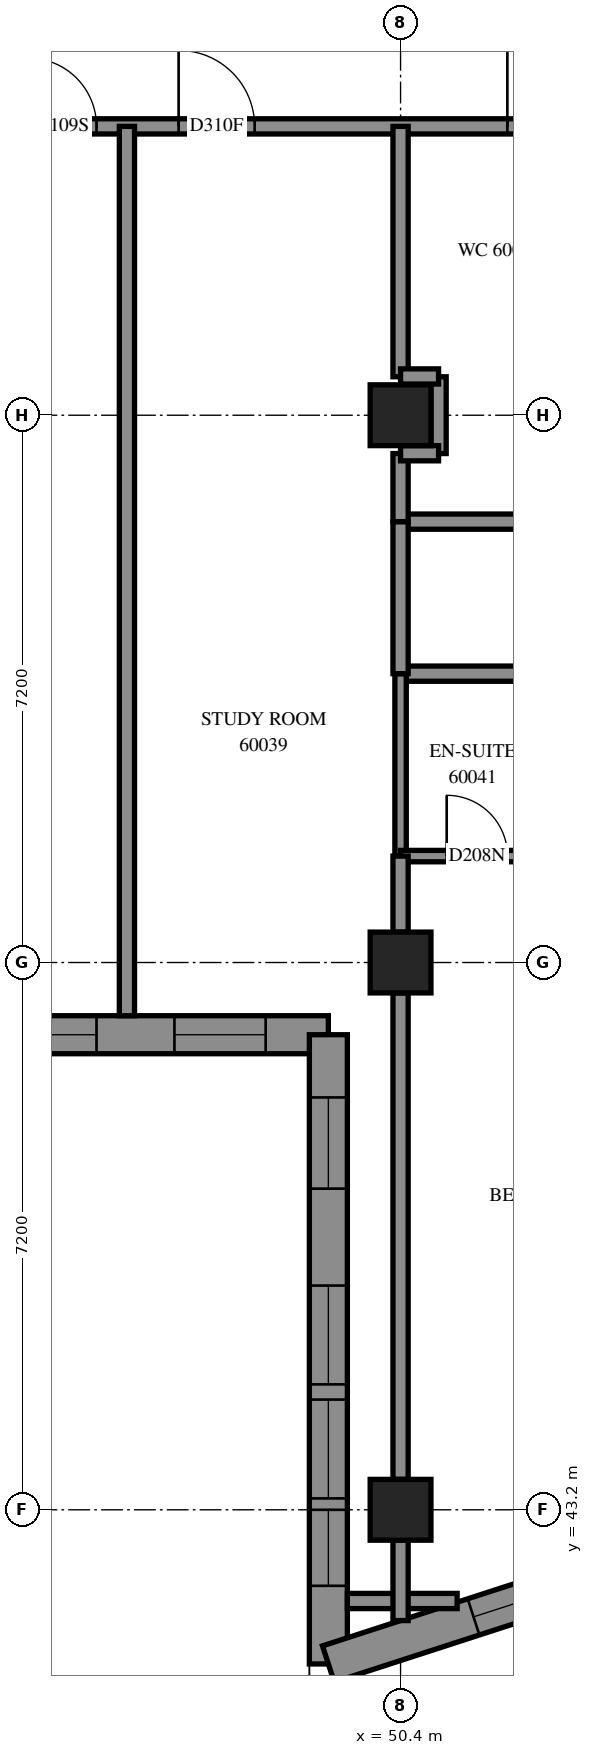
"""IFC4 building model, lengths in metres.
Left out: names, types, materials, properties, quantities, classifications, styles, units other than length and angle.
Written with IfcOpenShell. Run it as: python <this file> out.ifc"""

import sys

from ifc_helpers import new_model, si_unit, direction, frame, frame_2d, origin, origin_2d, place, context, subcontext, project, spatial, polyline, rectangle, outline, extrude, element, fill, save


model = new_model("IFC4")
c1 = context("Model", 3, precision=1e-05, world=origin(), true_north=direction((0.0, 1.0)))
c2 = subcontext(c1, "Body", "Model", "MODEL_VIEW")
j1 = project(units=[si_unit("LENGTHUNIT", "METRE"), si_unit("PLANEANGLEUNIT", "RADIAN")], contexts=[c1])
p1 = place(None, origin())
s1 = spatial("IfcSite", under=j1, at=p1, CompositionType="ELEMENT")
p2 = place(p1, origin())
s2 = spatial("IfcBuilding", under=s1, at=p2, CompositionType="ELEMENT")
p3 = place(p2, frame((0.0, 0.0, 220.2)))
s3 = spatial("IfcBuildingStorey", under=s2, at=p3, CompositionType="ELEMENT", Elevation=220.2)
for number, where, z_axis, x_axis in (
    (1, (50.4, 43.2, 0.0), (0.0, 0.0, 1.0), (1.0, 0.0, 0.0)),
    (2, (50.4, 50.4, 0.0), (0.0, 0.0, 1.0), (1.0, 0.0, 0.0)),
    (3, (50.4, 57.6, 0.0), (0.0, 0.0, 1.0), (1.0, 0.0, 0.0)),
):
    element("IfcColumn", number, at=place(p3, frame(where, z_axis=z_axis, x_axis=x_axis)), inside=s3, PredefinedType="COLUMN", context=c2, shape_type="SweptSolid", body=[
        extrude(rectangle(XDim=0.8, YDim=0.8, at=origin_2d()), origin(), (0.0, 0.0, 1.0), 3.1),
    ])
p4 = place(p3, frame((42.25, 49.45, 0.0), z_axis=(0.0, 0.0, 1.0), x_axis=(1.0, 0.0, 0.0)))
e4 = element("IfcWall", 4, at=p4, inside=s3, PredefinedType="SOLIDWALL", context=c2, shape_type="SweptSolid", body=[
    extrude(outline(polyline([(-0.25, -0.25), (6.95, -0.25), (7.45, 0.25), (0.25, 0.25), (-0.25, -0.25)])), origin(), (0.0, 0.0, 1.0), 3.1),
])
p5 = place(p4, frame((1.35, 0.0, 0.45)))
e5 = element("IfcOpeningElement", 5, at=p5, cuts=e4, PredefinedType="OPENING", context=c2, shape_type="SweptSolid", body=[
    extrude(rectangle(XDim=1.3, YDim=2.5, at=frame_2d((0.65, 1.25))), frame((0.0, 0.26, 0.0), z_axis=(0.0, -1.0, 0.0), x_axis=(1.0, 0.0, 0.0)), (0.0, 0.0, 1.0), 0.52),
])
p6 = place(p4, frame((2.85, 0.0, 0.45)))
e6 = element("IfcOpeningElement", 6, at=p6, cuts=e4, PredefinedType="OPENING", context=c2, shape_type="SweptSolid", body=[
    extrude(rectangle(XDim=1.3, YDim=2.5, at=frame_2d((0.65, 1.25))), frame((0.0, 0.26, 0.0), z_axis=(0.0, -1.0, 0.0), x_axis=(1.0, 0.0, 0.0)), (0.0, 0.0, 1.0), 0.52),
])
p7 = place(p4, frame((5.175, 0.0, 0.45)))
e7 = element("IfcOpeningElement", 7, at=p7, cuts=e4, PredefinedType="OPENING", context=c2, shape_type="SweptSolid", body=[
    extrude(rectangle(XDim=1.2, YDim=2.5, at=frame_2d((0.6, 1.25))), frame((0.0, 0.26, 0.0), z_axis=(0.0, -1.0, 0.0), x_axis=(1.0, 0.0, 0.0)), (0.0, 0.0, 1.0), 0.52),
])
p8 = place(p3, frame((49.45, 49.45, 0.0), z_axis=(0.0, 0.0, 1.0), x_axis=(0.0, -1.0, 0.0)))
e8 = element("IfcWall", 8, at=p8, inside=s3, PredefinedType="SOLIDWALL", context=c2, shape_type="SweptSolid", body=[
    extrude(outline(polyline([(0.25, -0.25), (8.622, -0.25), (7.934, 0.25), (-0.25, 0.25), (0.25, -0.25)])), origin(), (0.0, 0.0, 1.0), 3.1),
])
p9 = place(p8, frame((3.3, 0.0, 0.45)))
e9 = element("IfcOpeningElement", 9, at=p9, cuts=e8, PredefinedType="OPENING", context=c2, shape_type="SweptSolid", body=[
    extrude(rectangle(XDim=1.3, YDim=2.5, at=frame_2d((0.65, 1.25))), frame((0.0, 0.26, 0.0), z_axis=(0.0, -1.0, 0.0), x_axis=(1.0, 0.0, 0.0)), (0.0, 0.0, 1.0), 0.52),
])
p10 = place(p8, frame((4.8, 0.0, 0.45)))
e10 = element("IfcOpeningElement", 10, at=p10, cuts=e8, PredefinedType="OPENING", context=c2, shape_type="SweptSolid", body=[
    extrude(rectangle(XDim=1.3, YDim=2.5, at=frame_2d((0.65, 1.25))), frame((0.0, 0.26, 0.0), z_axis=(0.0, -1.0, 0.0), x_axis=(1.0, 0.0, 0.0)), (0.0, 0.0, 1.0), 0.52),
])
p11 = place(p8, frame((0.825, 0.0, 0.45)))
e11 = element("IfcOpeningElement", 11, at=p11, cuts=e8, PredefinedType="OPENING", context=c2, shape_type="SweptSolid", body=[
    extrude(rectangle(XDim=1.2, YDim=2.5, at=frame_2d((0.6, 1.25))), frame((0.0, 0.26, 0.0), z_axis=(0.0, -1.0, 0.0), x_axis=(1.0, 0.0, 0.0)), (0.0, 0.0, 1.0), 0.52),
])
p12 = place(p8, frame((6.25, 0.0, 0.45)))
e12 = element("IfcOpeningElement", 12, at=p12, cuts=e8, PredefinedType="OPENING", context=c2, shape_type="SweptSolid", body=[
    extrude(rectangle(XDim=1.0, YDim=2.5, at=frame_2d((0.5, 1.25))), frame((0.0, 0.26, 0.0), z_axis=(0.0, -1.0, 0.0), x_axis=(1.0, 0.0, 0.0)), (0.0, 0.0, 1.0), 0.52),
])
p13 = place(p3, frame((49.45, 41.172, 0.0), z_axis=(0.0, 0.0, 1.0), x_axis=(0.9512775992, 0.3083357412, 0.0)))
e13 = element("IfcWall", 13, at=p13, inside=s3, PredefinedType="SOLIDWALL", context=c2, shape_type="SweptSolid", body=[
    extrude(outline(polyline([(-0.344, -0.25), (3.457, -0.25), (3.577, 0.25), (0.344, 0.25), (-0.344, -0.25)])), origin(), (0.0, 0.0, 1.0), 3.1),
])
p14 = place(p13, frame((2.008, 0.0, 0.45)))
e14 = element("IfcOpeningElement", 14, at=p14, cuts=e13, PredefinedType="OPENING", context=c2, shape_type="SweptSolid", body=[
    extrude(rectangle(XDim=1.2, YDim=2.5, at=frame_2d((0.6, 1.25))), frame((0.0, 0.26, 0.0), z_axis=(0.0, -1.0, 0.0), x_axis=(1.0, 0.0, 0.0)), (0.0, 0.0, 1.0), 0.52),
])
p15 = place(p3, frame((36.0, 61.4, 0.0), z_axis=(0.0, 0.0, 1.0), x_axis=(1.0, 0.0, 0.0)))
e15 = element("IfcWall", 15, at=p15, inside=s3, PredefinedType="PARTITIONING", context=c2, shape_type="SweptSolid", body=[
    extrude(rectangle(XDim=17.0, YDim=0.2, at=frame_2d((8.5, 0.0))), origin(), (0.0, 0.0, 1.0), 3.1),
])
p16 = place(p15, frame((2.3, 0.0, 0.0)))
e16 = element("IfcOpeningElement", 16, at=p16, cuts=e15, PredefinedType="OPENING", context=c2, shape_type="SweptSolid", body=[
    extrude(rectangle(XDim=0.9, YDim=2.1, at=frame_2d((0.45, 1.05))), frame((0.0, 0.11, 0.0), z_axis=(0.0, -1.0, 0.0), x_axis=(1.0, 0.0, 0.0)), (0.0, 0.0, 1.0), 0.22),
])
p17 = place(p15, frame((4.125, 0.0, 0.0)))
e17 = element("IfcOpeningElement", 17, at=p17, cuts=e15, PredefinedType="OPENING", context=c2, shape_type="SweptSolid", body=[
    extrude(rectangle(XDim=1.0, YDim=2.1, at=frame_2d((0.5, 1.05))), frame((0.0, 0.11, 0.0), z_axis=(0.0, -1.0, 0.0), x_axis=(1.0, 0.0, 0.0)), (0.0, 0.0, 1.0), 0.22),
])
p18 = place(p15, frame((9.5, 0.0, 0.0)))
e18 = element("IfcOpeningElement", 18, at=p18, cuts=e15, PredefinedType="OPENING", context=c2, shape_type="SweptSolid", body=[
    extrude(rectangle(XDim=0.9, YDim=2.1, at=frame_2d((0.45, 1.05))), frame((0.0, 0.11, 0.0), z_axis=(0.0, -1.0, 0.0), x_axis=(1.0, 0.0, 0.0)), (0.0, 0.0, 1.0), 0.22),
])
p19 = place(p15, frame((11.48, 0.0, 0.0)))
e19 = element("IfcOpeningElement", 19, at=p19, cuts=e15, PredefinedType="OPENING", context=c2, shape_type="SweptSolid", body=[
    extrude(rectangle(XDim=1.0, YDim=2.1, at=frame_2d((0.5, 1.05))), frame((0.0, 0.11, 0.0), z_axis=(0.0, -1.0, 0.0), x_axis=(1.0, 0.0, 0.0)), (0.0, 0.0, 1.0), 0.22),
])
p20 = place(p15, frame((15.805, 0.0, 0.0)))
e20 = element("IfcOpeningElement", 20, at=p20, cuts=e15, PredefinedType="OPENING", context=c2, shape_type="SweptSolid", body=[
    extrude(rectangle(XDim=1.0, YDim=2.1, at=frame_2d((0.5, 1.05))), frame((0.0, 0.11, 0.0), z_axis=(0.0, -1.0, 0.0), x_axis=(1.0, 0.0, 0.0)), (0.0, 0.0, 1.0), 0.22),
])
p21 = place(p3, frame((46.8, 49.7, 0.0), z_axis=(0.0, 0.0, 1.0), x_axis=(0.0, 1.0, 0.0)))
e21 = element("IfcWall", 21, at=p21, inside=s3, PredefinedType="PARTITIONING", context=c2, shape_type="SweptSolid", body=[
    extrude(rectangle(XDim=11.7, YDim=0.2, at=frame_2d((5.85, 0.0))), origin(), (0.0, 0.0, 1.0), 3.1),
])
p22 = place(p3, frame((50.4, 43.6, 0.0), z_axis=(0.0, 0.0, 1.0), x_axis=(0.0, 1.0, 0.0)))
e22 = element("IfcWall", 22, at=p22, inside=s3, PredefinedType="PARTITIONING", context=c2, shape_type="SweptSolid", body=[
    extrude(rectangle(XDim=6.4, YDim=0.2, at=frame_2d((3.2, 0.0))), origin(), (0.0, 0.0, 1.0), 2.6),
])
p23 = place(p3, frame((50.4, 54.2, 0.0), z_axis=(0.0, 0.0, 1.0), x_axis=(1.0, 0.0, 0.0)))
e23 = element("IfcWall", 23, at=p23, inside=s3, PredefinedType="PARTITIONING", context=c2, shape_type="SweptSolid", body=[
    extrude(rectangle(XDim=4.6, YDim=0.2, at=frame_2d((2.3, 0.0))), origin(), (0.0, 0.0, 1.0), 3.1),
])
p24 = place(p23, frame((2.3, 0.0, 0.0)))
e24 = element("IfcOpeningElement", 24, at=p24, cuts=e23, PredefinedType="OPENING", context=c2, shape_type="SweptSolid", body=[
    extrude(rectangle(XDim=0.9, YDim=2.1, at=frame_2d((0.45, 1.05))), frame((0.0, 0.11, 0.0), z_axis=(0.0, -1.0, 0.0), x_axis=(1.0, 0.0, 0.0)), (0.0, 0.0, 1.0), 0.22),
])
p25 = place(p3, frame((50.4, 58.106, 0.0), z_axis=(0.0, 0.0, 1.0), x_axis=(0.0, 1.0, 0.0)))
e25 = element("IfcWall", 25, at=p25, inside=s3, PredefinedType="PARTITIONING", context=c2, shape_type="SweptSolid", body=[
    extrude(rectangle(XDim=3.294, YDim=0.2, at=frame_2d((1.647, 0.0))), origin(), (0.0, 0.0, 1.0), 3.1),
])
p26 = place(p3, frame((50.4, 56.2, 0.0), z_axis=(0.0, 0.0, 1.0), x_axis=(1.0, 0.0, 0.0)))
e26 = element("IfcWall", 26, at=p26, inside=s3, PredefinedType="PARTITIONING", context=c2, shape_type="SweptSolid", body=[
    extrude(rectangle(XDim=2.6, YDim=0.2, at=frame_2d((1.3, 0.0))), origin(), (0.0, 0.0, 1.0), 3.1),
])
p27 = place(p3, frame((50.4, 51.8, 0.0), z_axis=(0.0, 0.0, 1.0), x_axis=(0.0, 1.0, 0.0)))
e27 = element("IfcWall", 27, at=p27, inside=s3, PredefinedType="PARTITIONING", context=c2, shape_type="SweptSolid", body=[
    extrude(rectangle(XDim=2.4, YDim=0.15, at=frame_2d((1.2, 0.0))), origin(), (0.0, 0.0, 1.0), 3.1),
])
p28 = place(p3, frame((50.4, 54.2, 0.0), z_axis=(0.0, 0.0, 1.0), x_axis=(0.0, 1.0, 0.0)))
e28 = element("IfcWall", 28, at=p28, inside=s3, PredefinedType="PARTITIONING", context=c2, shape_type="SweptSolid", body=[
    extrude(rectangle(XDim=2.0, YDim=0.2, at=frame_2d((1.0, 0.0))), origin(), (0.0, 0.0, 1.0), 3.1),
])
p29 = place(p3, frame((50.4, 51.8, 0.0), z_axis=(0.0, 0.0, 1.0), x_axis=(1.0, 0.0, 0.0)))
e29 = element("IfcWall", 29, at=p29, inside=s3, PredefinedType="PARTITIONING", context=c2, shape_type="SweptSolid", body=[
    extrude(rectangle(XDim=1.9, YDim=0.15, at=frame_2d((0.95, 0.0))), origin(), (0.0, 0.0, 1.0), 3.1),
])
p30 = place(p29, frame((0.607, 0.0, 0.0)))
e30 = element("IfcOpeningElement", 30, at=p30, cuts=e29, PredefinedType="OPENING", context=c2, shape_type="SweptSolid", body=[
    extrude(rectangle(XDim=0.8, YDim=2.1, at=frame_2d((0.4, 1.05))), frame((0.0, 0.085, 0.0), z_axis=(0.0, -1.0, 0.0), x_axis=(1.0, 0.0, 0.0)), (0.0, 0.0, 1.0), 0.17),
])
p31 = place(p3, frame((49.7, 42.0, 0.0), z_axis=(0.0, 0.0, 1.0), x_axis=(1.0, 0.0, 0.0)))
e31 = element("IfcWall", 31, at=p31, inside=s3, PredefinedType="PARTITIONING", context=c2, shape_type="SweptSolid", body=[
    extrude(rectangle(XDim=1.444, YDim=0.2, at=frame_2d((0.722, 0.0))), origin(), (0.0, 0.0, 1.0), 3.1),
])
p32 = place(p3, frame((50.9, 57.096, 0.0), z_axis=(0.0, 0.0, 1.0), x_axis=(0.0, 1.0, 0.0)))
e32 = element("IfcWall", 32, at=p32, inside=s3, PredefinedType="PARTITIONING", context=c2, shape_type="SweptSolid", body=[
    extrude(rectangle(XDim=1.01, YDim=0.2, at=frame_2d((0.505, 0.0))), origin(), (0.0, 0.0, 1.0), 3.1),
])
p33 = place(p3, frame((50.4, 50.8, 0.0), z_axis=(0.0, 0.0, 1.0), x_axis=(0.0, 1.0, 0.0)))
e33 = element("IfcWall", 33, at=p33, inside=s3, PredefinedType="PARTITIONING", context=c2, shape_type="SweptSolid", body=[
    extrude(rectangle(XDim=1.0, YDim=0.2, at=frame_2d((0.5, 0.0))), origin(), (0.0, 0.0, 1.0), 3.1),
])
p34 = place(p3, frame((50.4, 56.2, 0.0), z_axis=(0.0, 0.0, 1.0), x_axis=(0.0, 1.0, 0.0)))
e34 = element("IfcWall", 34, at=p34, inside=s3, PredefinedType="PARTITIONING", context=c2, shape_type="SweptSolid", body=[
    extrude(rectangle(XDim=0.896, YDim=0.2, at=frame_2d((0.448, 0.0))), origin(), (0.0, 0.0, 1.0), 3.1),
])
p35 = place(p3, frame((50.4, 41.742, 0.0), z_axis=(0.0, 0.0, 1.0), x_axis=(0.0, 1.0, 0.0)))
e35 = element("IfcWall", 35, at=p35, inside=s3, PredefinedType="PARTITIONING", context=c2, shape_type="SweptSolid", body=[
    extrude(rectangle(XDim=1.058, YDim=0.2, at=frame_2d((0.529, 0.0))), origin(), (0.0, 0.0, 1.0), 3.1),
])
for number, where, z_axis, x_axis in (
    (36, (50.4, 58.11, 0.0), (0.0, 0.0, 1.0), (1.0, 0.0, 0.0)),
    (37, (50.4, 57.1, 0.0), (0.0, 0.0, 1.0), (1.0, 0.0, 0.0)),
):
    element("IfcWall", number, at=place(p3, frame(where, z_axis=z_axis, x_axis=x_axis)), inside=s3, PredefinedType="PARTITIONING", context=c2, shape_type="SweptSolid", body=[
        extrude(rectangle(XDim=0.5, YDim=0.2, at=frame_2d((0.25, 0.0))), origin(), (0.0, 0.0, 1.0), 3.1),
    ])
p36 = place(p6, origin())
e38 = element("IfcWindow", 38, at=p36, inside=s3, PartitioningType="SINGLE_PANEL", PredefinedType="WINDOW", context=c2, shape_type="SweptSolid", body=[
    extrude(rectangle(XDim=1.3, YDim=2.5, at=frame_2d((0.65, 1.25))), frame((0.0, 0.18, 0.0), z_axis=(0.0, -1.0, 0.0), x_axis=(1.0, 0.0, 0.0)), (0.0, 0.0, 1.0), 0.06),
])
fill(e6, e38)
p37 = place(p7, origin())
e39 = element("IfcWindow", 39, at=p37, inside=s3, PartitioningType="SINGLE_PANEL", PredefinedType="WINDOW", context=c2, shape_type="SweptSolid", body=[
    extrude(rectangle(XDim=1.2, YDim=2.5, at=frame_2d((0.6, 1.25))), frame((0.0, 0.18, 0.0), z_axis=(0.0, -1.0, 0.0), x_axis=(1.0, 0.0, 0.0)), (0.0, 0.0, 1.0), 0.06),
])
fill(e7, e39)
p38 = place(p9, origin())
e40 = element("IfcWindow", 40, at=p38, inside=s3, PartitioningType="SINGLE_PANEL", PredefinedType="WINDOW", context=c2, shape_type="SweptSolid", body=[
    extrude(rectangle(XDim=1.3, YDim=2.5, at=frame_2d((0.65, 1.25))), frame((0.0, 0.18, 0.0), z_axis=(0.0, -1.0, 0.0), x_axis=(1.0, 0.0, 0.0)), (0.0, 0.0, 1.0), 0.06),
])
fill(e9, e40)
p39 = place(p10, origin())
e41 = element("IfcWindow", 41, at=p39, inside=s3, PartitioningType="SINGLE_PANEL", PredefinedType="WINDOW", context=c2, shape_type="SweptSolid", body=[
    extrude(rectangle(XDim=1.3, YDim=2.5, at=frame_2d((0.65, 1.25))), frame((0.0, 0.18, 0.0), z_axis=(0.0, -1.0, 0.0), x_axis=(1.0, 0.0, 0.0)), (0.0, 0.0, 1.0), 0.06),
])
fill(e10, e41)
p40 = place(p11, origin())
e42 = element("IfcWindow", 42, at=p40, inside=s3, PartitioningType="SINGLE_PANEL", PredefinedType="WINDOW", context=c2, shape_type="SweptSolid", body=[
    extrude(rectangle(XDim=1.2, YDim=2.5, at=frame_2d((0.6, 1.25))), frame((0.0, 0.18, 0.0), z_axis=(0.0, -1.0, 0.0), x_axis=(1.0, 0.0, 0.0)), (0.0, 0.0, 1.0), 0.06),
])
fill(e11, e42)
p41 = place(p14, origin())
e43 = element("IfcWindow", 43, at=p41, inside=s3, PartitioningType="SINGLE_PANEL", PredefinedType="WINDOW", context=c2, shape_type="SweptSolid", body=[
    extrude(rectangle(XDim=1.2, YDim=2.5, at=frame_2d((0.6, 1.25))), frame((0.0, 0.18, 0.0), z_axis=(0.0, -1.0, 0.0), x_axis=(1.0, 0.0, 0.0)), (0.0, 0.0, 1.0), 0.06),
])
fill(e14, e43)
p42 = place(p18, origin())
e44 = element("IfcDoor", 44, at=p42, inside=s3, OperationType="SINGLE_SWING_LEFT", PredefinedType="DOOR", context=c2, shape_type="SweptSolid", body=[
    extrude(rectangle(XDim=0.9, YDim=2.1, at=frame_2d((0.45, 1.05))), frame((0.0, 0.025, 0.0), z_axis=(0.0, -1.0, 0.0), x_axis=(1.0, 0.0, 0.0)), (0.0, 0.0, 1.0), 0.05),
])
fill(e18, e44)
p43 = place(p19, origin())
e45 = element("IfcDoor", 45, at=p43, inside=s3, OperationType="SINGLE_SWING_RIGHT", PredefinedType="DOOR", context=c2, shape_type="SweptSolid", body=[
    extrude(rectangle(XDim=1.0, YDim=2.1, at=frame_2d((0.5, 1.05))), frame((0.0, 0.025, 0.0), z_axis=(0.0, -1.0, 0.0), x_axis=(1.0, 0.0, 0.0)), (0.0, 0.0, 1.0), 0.05),
])
fill(e19, e45)
p44 = place(p30, origin())
e46 = element("IfcDoor", 46, at=p44, inside=s3, OperationType="SINGLE_SWING_RIGHT", PredefinedType="DOOR", context=c2, shape_type="SweptSolid", body=[
    extrude(rectangle(XDim=0.8, YDim=2.1, at=frame_2d((0.4, 1.05))), frame((0.0, 0.025, 0.0), z_axis=(0.0, -1.0, 0.0), x_axis=(1.0, 0.0, 0.0)), (0.0, 0.0, 1.0), 0.05),
])
fill(e30, e46)
p45 = place(p20, origin())
e47 = element("IfcDoor", 47, at=p45, inside=s3, OperationType="SINGLE_SWING_LEFT", PredefinedType="DOOR", context=c2, shape_type="SweptSolid", body=[
    extrude(rectangle(XDim=1.0, YDim=2.1, at=frame_2d((0.5, 1.05))), frame((0.0, 0.025, 0.0), z_axis=(0.0, -1.0, 0.0), x_axis=(1.0, 0.0, 0.0)), (0.0, 0.0, 1.0), 0.05),
])
fill(e20, e47)
p46 = place(p12, origin())
e48 = element("IfcWindow", 48, at=p46, inside=s3, PartitioningType="SINGLE_PANEL", PredefinedType="WINDOW", context=c2, shape_type="SweptSolid", body=[
    extrude(rectangle(XDim=1.0, YDim=2.5, at=frame_2d((0.5, 1.25))), frame((0.0, 0.18, 0.0), z_axis=(0.0, -1.0, 0.0), x_axis=(1.0, 0.0, 0.0)), (0.0, 0.0, 1.0), 0.06),
])
fill(e12, e48)
save(model, sys.argv[1])
